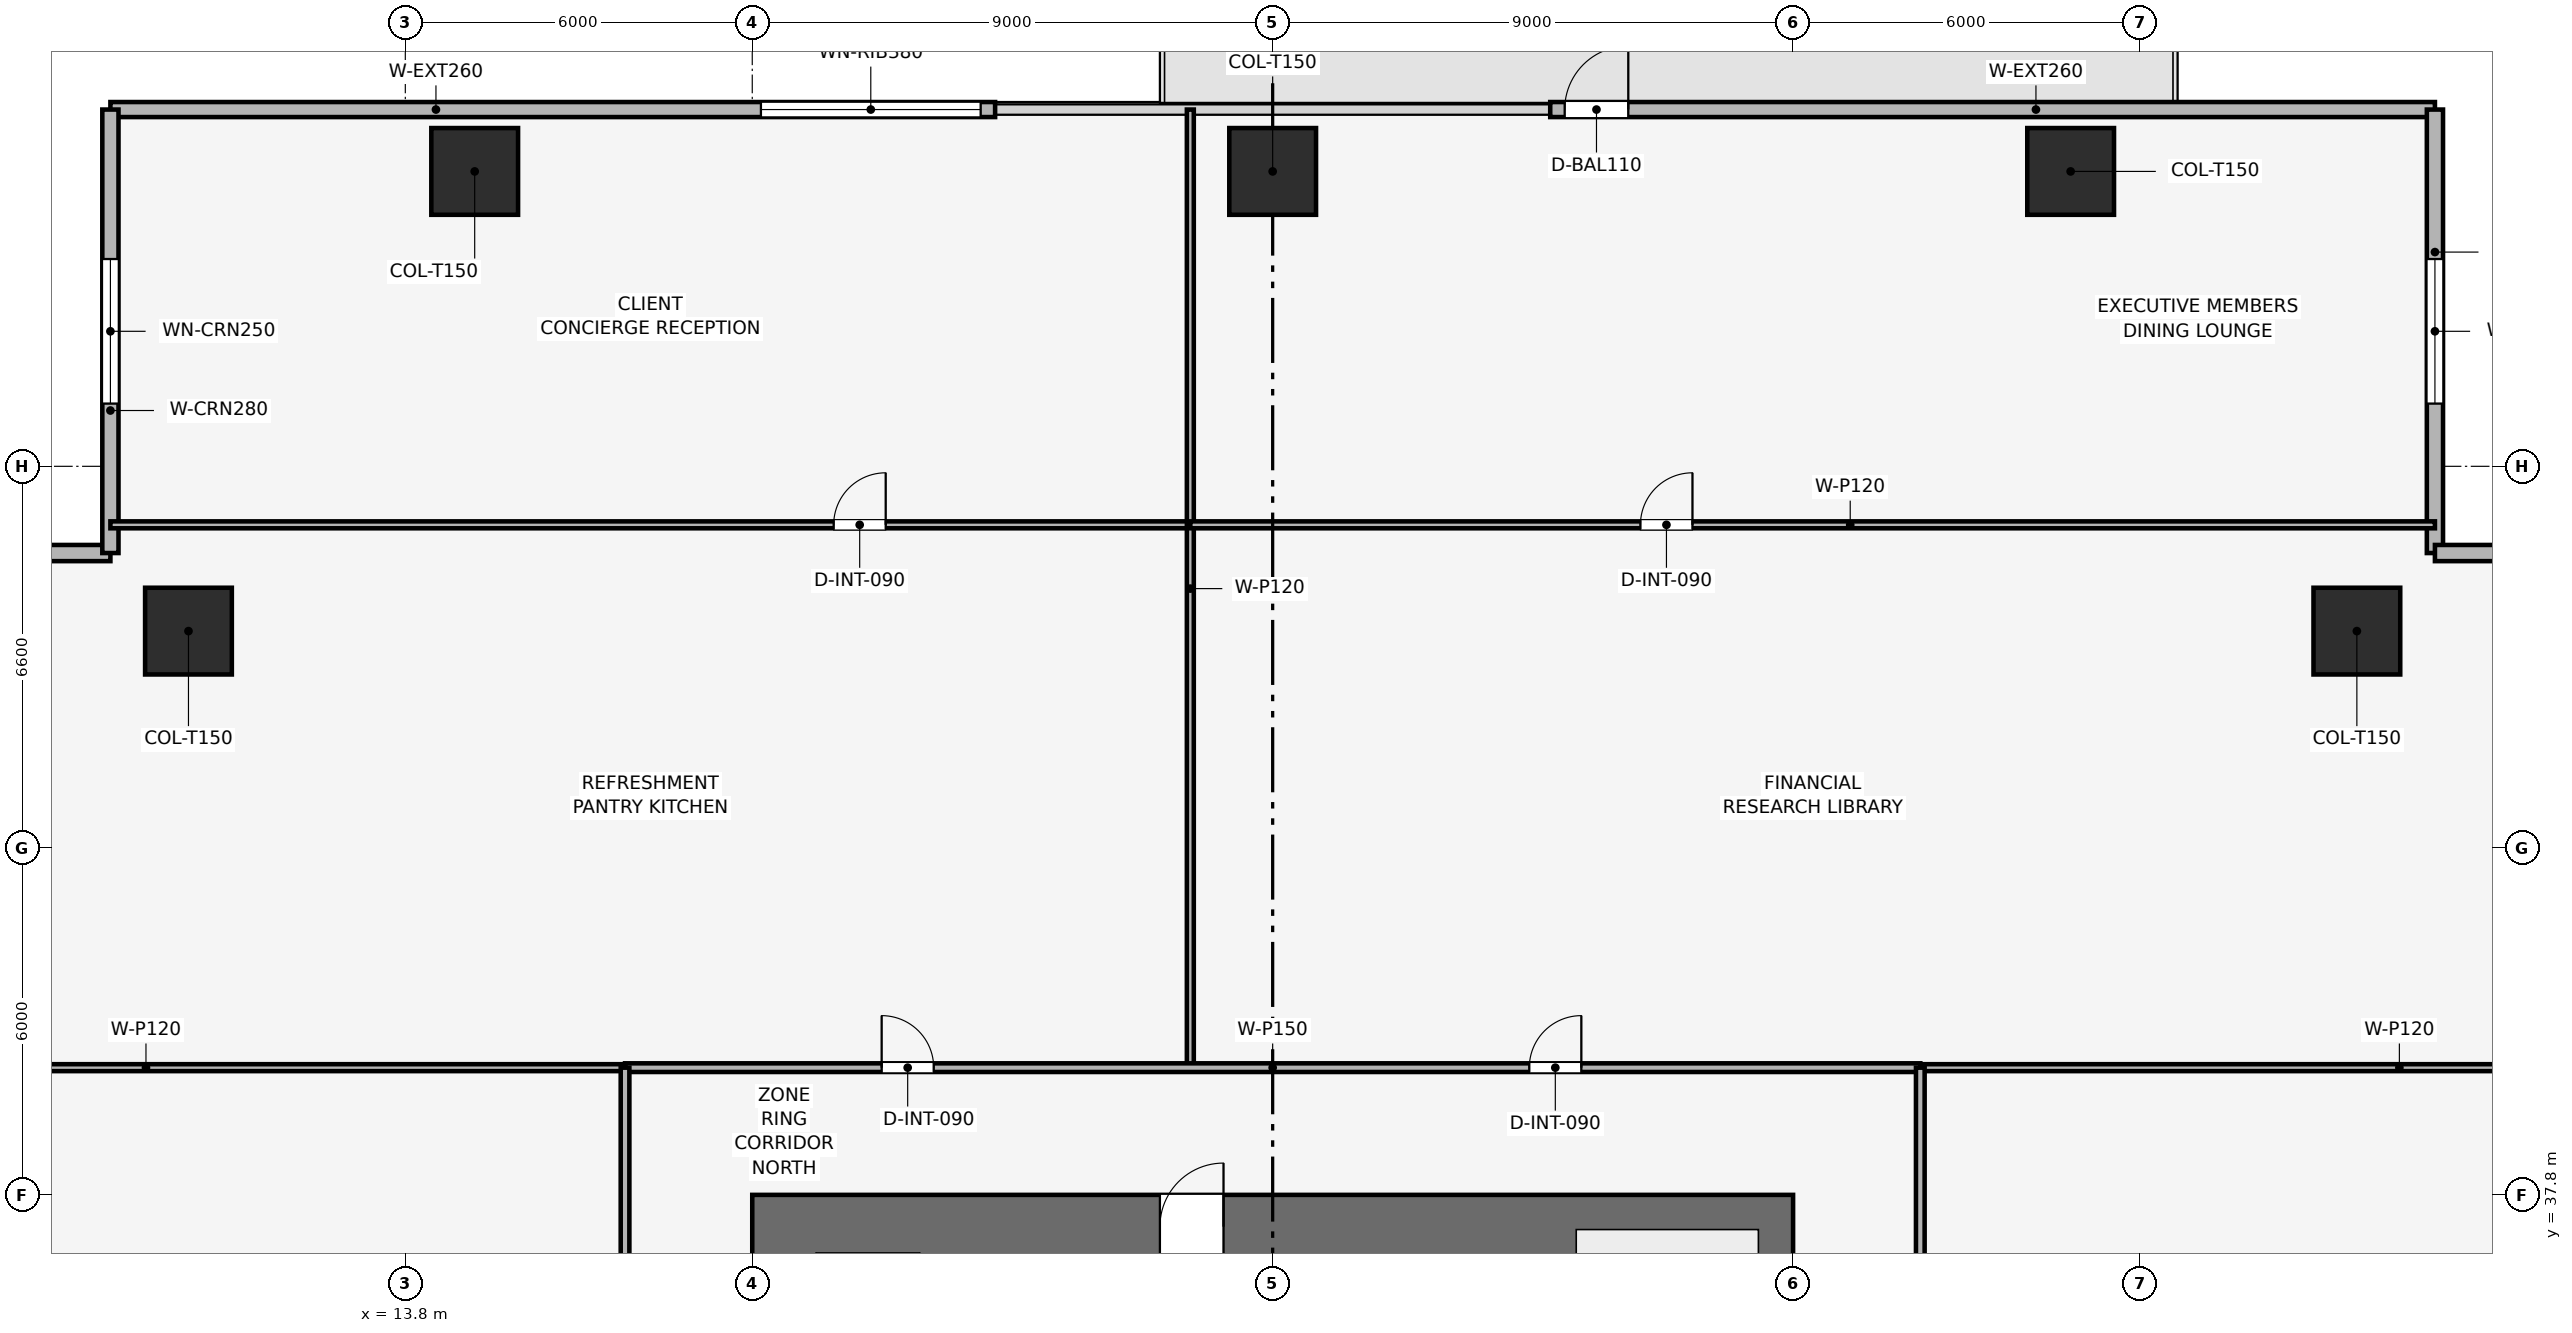
"""IFC4 building model, lengths in metres.
Left out: names, types, materials, properties, quantities, classifications, styles, units other than length and angle.
Written with IfcOpenShell. Run it as: python <this file> out.ifc"""

import sys

from ifc_helpers import new_model, si_unit, direction, frame, frame_2d, origin, origin_2d, place, context, subcontext, project, spatial, rectangle, extrude, element, fill, save


model = new_model("IFC4")
c1 = context("Model", 3, precision=1e-05, world=origin(), true_north=direction((0.0, 1.0)))
c2 = subcontext(c1, "Body", "Model", "MODEL_VIEW")
j1 = project(units=[si_unit("LENGTHUNIT", "METRE"), si_unit("PLANEANGLEUNIT", "RADIAN")], contexts=[c1])
p1 = place(None, origin())
s1 = spatial("IfcSite", under=j1, at=p1, CompositionType="ELEMENT")
p2 = place(p1, origin())
s2 = spatial("IfcBuilding", under=s1, at=p2, CompositionType="ELEMENT")
p3 = place(p2, frame((0.0, 0.0, 76.8)))
s3 = spatial("IfcBuildingStorey", under=s2, at=p3, CompositionType="ELEMENT", Elevation=76.8)
p4 = place(p3, frame((19.8, 37.25, 0.0), z_axis=(0.0, 0.0, 1.0), x_axis=(1.0, 0.0, 0.0)))
e1 = element("IfcWall", 1, at=p4, inside=s3, PredefinedType="SHEAR", context=c2, shape_type="SweptSolid", body=[
    extrude(rectangle(XDim=18.0, YDim=1.1, at=frame_2d((9.0, 0.0))), origin(), (0.0, 0.0, 1.0), 3.9),
])
p5 = place(p4, frame((7.05, 0.0, 0.0)))
e2 = element("IfcOpeningElement", 2, at=p5, cuts=e1, PredefinedType="OPENING", context=c2, shape_type="SweptSolid", body=[
    extrude(rectangle(XDim=1.1, YDim=2.15, at=frame_2d((0.55, 1.075))), frame((0.0, 0.56, 0.0), z_axis=(0.0, -1.0, 0.0), x_axis=(1.0, 0.0, 0.0)), (0.0, 0.0, 1.0), 1.12),
])
for number, where, z_axis, x_axis in (
    (3, (42.6, 55.5, 0.003), (0.0, 0.0, 1.0), (1.0, 0.0, 0.0)),
    (4, (28.8, 55.5, 0.003), (0.0, 0.0, 1.0), (1.0, 0.0, 0.0)),
    (5, (15.0, 55.5, 0.003), (0.0, 0.0, 1.0), (1.0, 0.0, 0.0)),
    (6, (47.55, 47.55, 0.003), (0.0, 0.0, 1.0), (1.0, 0.0, 0.0)),
    (7, (10.05, 47.55, 0.003), (0.0, 0.0, 1.0), (1.0, 0.0, 0.0)),
):
    element("IfcColumn", number, at=place(p3, frame(where, z_axis=z_axis, x_axis=x_axis)), inside=s3, PredefinedType="COLUMN", context=c2, shape_type="SweptSolid", body=[
        extrude(rectangle(XDim=1.5, YDim=1.5, at=origin_2d()), origin(), (0.0, 0.0, 1.0), 3.644),
    ])
p6 = place(p3, frame((8.7, 56.57, 0.0), z_axis=(0.0, 0.0, 1.0), x_axis=(1.0, 0.0, 0.0)))
e8 = element("IfcWall", 8, at=p6, inside=s3, PredefinedType="SOLIDWALL", context=c2, shape_type="SweptSolid", body=[
    extrude(rectangle(XDim=15.3, YDim=0.26, at=frame_2d((7.65, 0.0))), origin(), (0.0, 0.0, 1.0), 3.65),
])
p7 = place(p6, frame((11.25, 0.0, 0.9)))
e9 = element("IfcOpeningElement", 9, at=p7, cuts=e8, PredefinedType="OPENING", context=c2, shape_type="SweptSolid", body=[
    extrude(rectangle(XDim=3.8, YDim=1.9, at=frame_2d((1.9, 0.95))), frame((0.0, 0.14, 0.0), z_axis=(0.0, -1.0, 0.0), x_axis=(1.0, 0.0, 0.0)), (0.0, 0.0, 1.0), 0.28),
])
p8 = place(p3, frame((33.6, 56.57, 0.0), z_axis=(0.0, 0.0, 1.0), x_axis=(1.0, 0.0, 0.0)))
e10 = element("IfcWall", 10, at=p8, inside=s3, PredefinedType="SOLIDWALL", context=c2, shape_type="SweptSolid", body=[
    extrude(rectangle(XDim=15.3, YDim=0.26, at=frame_2d((7.65, 0.0))), origin(), (0.0, 0.0, 1.0), 3.65),
])
p9 = place(p8, frame((0.25, 0.0, 0.0)))
e11 = element("IfcOpeningElement", 11, at=p9, cuts=e10, PredefinedType="OPENING", context=c2, shape_type="SweptSolid", body=[
    extrude(rectangle(XDim=1.1, YDim=2.2, at=frame_2d((0.55, 1.1))), frame((0.0, 0.14, 0.0), z_axis=(0.0, -1.0, 0.0), x_axis=(1.0, 0.0, 0.0)), (0.0, 0.0, 1.0), 0.28),
])
p10 = place(p3, frame((1.03, 48.9, 0.0), z_axis=(0.0, 0.0, 1.0), x_axis=(1.0, 0.0, 0.0)))
e12 = element("IfcWall", 12, at=p10, inside=s3, PredefinedType="SOLIDWALL", context=c2, shape_type="SweptSolid", body=[
    extrude(rectangle(XDim=7.67, YDim=0.28, at=frame_2d((3.835, 0.0))), origin(), (0.0, 0.0, 1.0), 3.65),
])
p11 = place(p10, frame((2.585, 0.0, 0.9)))
e13 = element("IfcOpeningElement", 13, at=p11, cuts=e12, PredefinedType="OPENING", context=c2, shape_type="SweptSolid", body=[
    extrude(rectangle(XDim=2.5, YDim=1.9, at=frame_2d((1.25, 0.95))), frame((0.0, 0.15, 0.0), z_axis=(0.0, -1.0, 0.0), x_axis=(1.0, 0.0, 0.0)), (0.0, 0.0, 1.0), 0.3),
])
p12 = place(p3, frame((8.7, 48.9, 0.0), z_axis=(0.0, 0.0, 1.0), x_axis=(0.0, 1.0, 0.0)))
e14 = element("IfcWall", 14, at=p12, inside=s3, PredefinedType="SOLIDWALL", context=c2, shape_type="SweptSolid", body=[
    extrude(rectangle(XDim=7.67, YDim=0.28, at=frame_2d((3.835, 0.0))), origin(), (0.0, 0.0, 1.0), 3.65),
])
p13 = place(p12, frame((2.585, 0.0, 0.9)))
e15 = element("IfcOpeningElement", 15, at=p13, cuts=e14, PredefinedType="OPENING", context=c2, shape_type="SweptSolid", body=[
    extrude(rectangle(XDim=2.5, YDim=1.9, at=frame_2d((1.25, 0.95))), frame((0.0, 0.15, 0.0), z_axis=(0.0, -1.0, 0.0), x_axis=(1.0, 0.0, 0.0)), (0.0, 0.0, 1.0), 0.3),
])
p14 = place(p3, frame((48.9, 56.57, 0.0), z_axis=(0.0, 0.0, 1.0), x_axis=(0.0, -1.0, 0.0)))
e16 = element("IfcWall", 16, at=p14, inside=s3, PredefinedType="SOLIDWALL", context=c2, shape_type="SweptSolid", body=[
    extrude(rectangle(XDim=7.67, YDim=0.28, at=frame_2d((3.835, 0.0))), origin(), (0.0, 0.0, 1.0), 3.65),
])
p15 = place(p14, frame((2.585, 0.0, 0.9)))
e17 = element("IfcOpeningElement", 17, at=p15, cuts=e16, PredefinedType="OPENING", context=c2, shape_type="SweptSolid", body=[
    extrude(rectangle(XDim=2.5, YDim=1.9, at=frame_2d((1.25, 0.95))), frame((0.0, 0.15, 0.0), z_axis=(0.0, -1.0, 0.0), x_axis=(1.0, 0.0, 0.0)), (0.0, 0.0, 1.0), 0.3),
])
p16 = place(p3, frame((48.9, 48.9, 0.0), z_axis=(0.0, 0.0, 1.0), x_axis=(1.0, 0.0, 0.0)))
e18 = element("IfcWall", 18, at=p16, inside=s3, PredefinedType="SOLIDWALL", context=c2, shape_type="SweptSolid", body=[
    extrude(rectangle(XDim=7.67, YDim=0.28, at=frame_2d((3.835, 0.0))), origin(), (0.0, 0.0, 1.0), 3.65),
])
p17 = place(p16, frame((2.585, 0.0, 0.9)))
e19 = element("IfcOpeningElement", 19, at=p17, cuts=e18, PredefinedType="OPENING", context=c2, shape_type="SweptSolid", body=[
    extrude(rectangle(XDim=2.5, YDim=1.9, at=frame_2d((1.25, 0.95))), frame((0.0, 0.15, 0.0), z_axis=(0.0, -1.0, 0.0), x_axis=(1.0, 0.0, 0.0)), (0.0, 0.0, 1.0), 0.3),
])
p18 = place(p3, frame((8.7, 49.388, 0.0), z_axis=(0.0, 0.0, 1.0), x_axis=(1.0, 0.0, 0.0)))
e20 = element("IfcWall", 20, at=p18, inside=s3, PredefinedType="PARTITIONING", context=c2, shape_type="SweptSolid", body=[
    extrude(rectangle(XDim=18.676, YDim=0.12, at=frame_2d((9.338, 0.0))), origin(), (0.0, 0.0, 1.0), 2.935),
])
p19 = place(p18, frame((12.508, 0.0, 0.0)))
e21 = element("IfcOpeningElement", 21, at=p19, cuts=e20, PredefinedType="OPENING", context=c2, shape_type="SweptSolid", body=[
    extrude(rectangle(XDim=0.9, YDim=2.1, at=frame_2d((0.45, 1.05))), frame((0.0, 0.07, 0.0), z_axis=(0.0, -1.0, 0.0), x_axis=(1.0, 0.0, 0.0)), (0.0, 0.0, 1.0), 0.14),
])
p20 = place(p3, frame((27.376, 40.0, 0.0), z_axis=(0.0, 0.0, 1.0), x_axis=(0.0, 1.0, 0.0)))
e22 = element("IfcWall", 22, at=p20, inside=s3, PredefinedType="PARTITIONING", context=c2, shape_type="SweptSolid", body=[
    extrude(rectangle(XDim=16.57, YDim=0.12, at=frame_2d((8.285, 0.0))), origin(), (0.0, 0.0, 1.0), 2.935),
])
p21 = place(p3, frame((27.376, 49.388, 0.0), z_axis=(0.0, 0.0, 1.0), x_axis=(1.0, 0.0, 0.0)))
e23 = element("IfcWall", 23, at=p21, inside=s3, PredefinedType="PARTITIONING", context=c2, shape_type="SweptSolid", body=[
    extrude(rectangle(XDim=21.524, YDim=0.12, at=frame_2d((10.762, 0.0))), origin(), (0.0, 0.0, 1.0), 2.935),
])
p22 = place(p21, frame((7.784, 0.0, 0.0)))
e24 = element("IfcOpeningElement", 24, at=p22, cuts=e23, PredefinedType="OPENING", context=c2, shape_type="SweptSolid", body=[
    extrude(rectangle(XDim=0.9, YDim=2.1, at=frame_2d((0.45, 1.05))), frame((0.0, 0.07, 0.0), z_axis=(0.0, -1.0, 0.0), x_axis=(1.0, 0.0, 0.0)), (0.0, 0.0, 1.0), 0.14),
])
for number, where, z_axis, x_axis in (
    (25, (1.03, 40.0, 0.0), (0.0, 0.0, 1.0), (1.0, 0.0, 0.0)),
    (26, (40.0, 40.0, 0.0), (0.0, 0.0, 1.0), (1.0, 0.0, 0.0)),
):
    element("IfcWall", number, at=place(p3, frame(where, z_axis=z_axis, x_axis=x_axis)), inside=s3, PredefinedType="PARTITIONING", context=c2, shape_type="SweptSolid", body=[
        extrude(rectangle(XDim=16.57, YDim=0.12, at=frame_2d((8.285, 0.0))), origin(), (0.0, 0.0, 1.0), 2.935),
    ])
p23 = place(p3, frame((17.6, 40.0, 0.0), z_axis=(0.0, 0.0, 1.0), x_axis=(1.0, 0.0, 0.0)))
e27 = element("IfcWall", 27, at=p23, inside=s3, PredefinedType="PARTITIONING", context=c2, shape_type="SweptSolid", body=[
    extrude(rectangle(XDim=22.4, YDim=0.15, at=frame_2d((11.2, 0.0))), origin(), (0.0, 0.0, 1.0), 3.085),
])
p24 = place(p23, frame((4.438, 0.0, 0.0)))
e28 = element("IfcOpeningElement", 28, at=p24, cuts=e27, PredefinedType="OPENING", context=c2, shape_type="SweptSolid", body=[
    extrude(rectangle(XDim=0.9, YDim=2.1, at=frame_2d((0.45, 1.05))), frame((0.0, 0.085, 0.0), z_axis=(0.0, -1.0, 0.0), x_axis=(1.0, 0.0, 0.0)), (0.0, 0.0, 1.0), 0.17),
])
p25 = place(p23, frame((15.638, 0.0, 0.0)))
e29 = element("IfcOpeningElement", 29, at=p25, cuts=e27, PredefinedType="OPENING", context=c2, shape_type="SweptSolid", body=[
    extrude(rectangle(XDim=0.9, YDim=2.1, at=frame_2d((0.45, 1.05))), frame((0.0, 0.085, 0.0), z_axis=(0.0, -1.0, 0.0), x_axis=(1.0, 0.0, 0.0)), (0.0, 0.0, 1.0), 0.17),
])
p26 = place(p3, frame((17.6, 17.6, 0.0), z_axis=(0.0, 0.0, 1.0), x_axis=(0.0, 1.0, 0.0)))
e30 = element("IfcWall", 30, at=p26, inside=s3, PredefinedType="PARTITIONING", context=c2, shape_type="SweptSolid", body=[
    extrude(rectangle(XDim=22.4, YDim=0.15, at=frame_2d((11.2, 0.0))), origin(), (0.0, 0.0, 1.0), 3.085),
])
p27 = place(p26, frame((1.4, 0.0, 0.0)))
e31 = element("IfcOpeningElement", 31, at=p27, cuts=e30, PredefinedType="OPENING", context=c2, shape_type="SweptSolid", body=[
    extrude(rectangle(XDim=0.9, YDim=2.1, at=frame_2d((0.45, 1.05))), frame((0.0, 0.085, 0.0), z_axis=(0.0, -1.0, 0.0), x_axis=(1.0, 0.0, 0.0)), (0.0, 0.0, 1.0), 0.17),
])
p28 = place(p26, frame((4.65, 0.0, 0.0)))
e32 = element("IfcOpeningElement", 32, at=p28, cuts=e30, PredefinedType="OPENING", context=c2, shape_type="SweptSolid", body=[
    extrude(rectangle(XDim=0.9, YDim=2.1, at=frame_2d((0.45, 1.05))), frame((0.0, 0.085, 0.0), z_axis=(0.0, -1.0, 0.0), x_axis=(1.0, 0.0, 0.0)), (0.0, 0.0, 1.0), 0.17),
])
p29 = place(p26, frame((7.55, 0.0, 0.0)))
e33 = element("IfcOpeningElement", 33, at=p29, cuts=e30, PredefinedType="OPENING", context=c2, shape_type="SweptSolid", body=[
    extrude(rectangle(XDim=0.9, YDim=2.1, at=frame_2d((0.45, 1.05))), frame((0.0, 0.085, 0.0), z_axis=(0.0, -1.0, 0.0), x_axis=(1.0, 0.0, 0.0)), (0.0, 0.0, 1.0), 0.17),
])
p30 = place(p26, frame((10.3, 0.0, 0.0)))
e34 = element("IfcOpeningElement", 34, at=p30, cuts=e30, PredefinedType="OPENING", context=c2, shape_type="SweptSolid", body=[
    extrude(rectangle(XDim=0.95, YDim=2.1, at=frame_2d((0.475, 1.05))), frame((0.0, 0.085, 0.0), z_axis=(0.0, -1.0, 0.0), x_axis=(1.0, 0.0, 0.0)), (0.0, 0.0, 1.0), 0.17),
])
p31 = place(p26, frame((16.8, 0.0, 0.0)))
e35 = element("IfcOpeningElement", 35, at=p31, cuts=e30, PredefinedType="OPENING", context=c2, shape_type="SweptSolid", body=[
    extrude(rectangle(XDim=0.9, YDim=2.1, at=frame_2d((0.45, 1.05))), frame((0.0, 0.085, 0.0), z_axis=(0.0, -1.0, 0.0), x_axis=(1.0, 0.0, 0.0)), (0.0, 0.0, 1.0), 0.17),
])
p32 = place(p3, frame((40.0, 17.6, 0.0), z_axis=(0.0, 0.0, 1.0), x_axis=(0.0, 1.0, 0.0)))
e36 = element("IfcWall", 36, at=p32, inside=s3, PredefinedType="PARTITIONING", context=c2, shape_type="SweptSolid", body=[
    extrude(rectangle(XDim=22.4, YDim=0.15, at=frame_2d((11.2, 0.0))), origin(), (0.0, 0.0, 1.0), 3.085),
])
p33 = place(p32, frame((0.7, 0.0, 0.0)))
e37 = element("IfcOpeningElement", 37, at=p33, cuts=e36, PredefinedType="OPENING", context=c2, shape_type="SweptSolid", body=[
    extrude(rectangle(XDim=0.9, YDim=2.1, at=frame_2d((0.45, 1.05))), frame((0.0, 0.085, 0.0), z_axis=(0.0, -1.0, 0.0), x_axis=(1.0, 0.0, 0.0)), (0.0, 0.0, 1.0), 0.17),
])
p34 = place(p32, frame((4.927, 0.0, 0.0)))
e38 = element("IfcOpeningElement", 38, at=p34, cuts=e36, PredefinedType="OPENING", context=c2, shape_type="SweptSolid", body=[
    extrude(rectangle(XDim=0.9, YDim=2.1, at=frame_2d((0.45, 1.05))), frame((0.0, 0.085, 0.0), z_axis=(0.0, -1.0, 0.0), x_axis=(1.0, 0.0, 0.0)), (0.0, 0.0, 1.0), 0.17),
])
p35 = place(p32, frame((10.886, 0.0, 0.0)))
e39 = element("IfcOpeningElement", 39, at=p35, cuts=e36, PredefinedType="OPENING", context=c2, shape_type="SweptSolid", body=[
    extrude(rectangle(XDim=0.9, YDim=2.1, at=frame_2d((0.45, 1.05))), frame((0.0, 0.085, 0.0), z_axis=(0.0, -1.0, 0.0), x_axis=(1.0, 0.0, 0.0)), (0.0, 0.0, 1.0), 0.17),
])
p36 = place(p32, frame((17.859, 0.0, 0.0)))
e40 = element("IfcOpeningElement", 40, at=p36, cuts=e36, PredefinedType="OPENING", context=c2, shape_type="SweptSolid", body=[
    extrude(rectangle(XDim=0.9, YDim=2.1, at=frame_2d((0.45, 1.05))), frame((0.0, 0.085, 0.0), z_axis=(0.0, -1.0, 0.0), x_axis=(1.0, 0.0, 0.0)), (0.0, 0.0, 1.0), 0.17),
])
p37 = place(p9, origin())
e41 = element("IfcDoor", 41, at=p37, inside=s3, OperationType="SINGLE_SWING_RIGHT", PredefinedType="DOOR", context=c2, shape_type="SweptSolid", body=[
    extrude(rectangle(XDim=1.1, YDim=2.2, at=frame_2d((0.55, 1.1))), frame((0.0, 0.025, 0.0), z_axis=(0.0, -1.0, 0.0), x_axis=(1.0, 0.0, 0.0)), (0.0, 0.0, 1.0), 0.05),
])
fill(e11, e41)
p38 = place(p7, origin())
e42 = element("IfcWindow", 42, at=p38, inside=s3, PartitioningType="SINGLE_PANEL", PredefinedType="WINDOW", context=c2, shape_type="SweptSolid", body=[
    extrude(rectangle(XDim=3.8, YDim=1.9, at=frame_2d((1.9, 0.95))), frame((0.0, 0.03, 0.0), z_axis=(0.0, -1.0, 0.0), x_axis=(1.0, 0.0, 0.0)), (0.0, 0.0, 1.0), 0.06),
])
fill(e9, e42)
p39 = place(p13, origin())
e43 = element("IfcWindow", 43, at=p39, inside=s3, PartitioningType="SINGLE_PANEL", PredefinedType="WINDOW", context=c2, shape_type="SweptSolid", body=[
    extrude(rectangle(XDim=2.5, YDim=1.9, at=frame_2d((1.25, 0.95))), frame((0.0, 0.03, 0.0), z_axis=(0.0, -1.0, 0.0), x_axis=(1.0, 0.0, 0.0)), (0.0, 0.0, 1.0), 0.06),
])
fill(e15, e43)
p40 = place(p15, origin())
e44 = element("IfcWindow", 44, at=p40, inside=s3, PartitioningType="SINGLE_PANEL", PredefinedType="WINDOW", context=c2, shape_type="SweptSolid", body=[
    extrude(rectangle(XDim=2.5, YDim=1.9, at=frame_2d((1.25, 0.95))), frame((0.0, 0.03, 0.0), z_axis=(0.0, -1.0, 0.0), x_axis=(1.0, 0.0, 0.0)), (0.0, 0.0, 1.0), 0.06),
])
fill(e17, e44)
p41 = place(p19, origin())
e45 = element("IfcDoor", 45, at=p41, inside=s3, OperationType="SINGLE_SWING_RIGHT", PredefinedType="DOOR", context=c2, shape_type="SweptSolid", body=[
    extrude(rectangle(XDim=0.9, YDim=2.1, at=frame_2d((0.45, 1.05))), frame((0.0, 0.025, 0.0), z_axis=(0.0, -1.0, 0.0), x_axis=(1.0, 0.0, 0.0)), (0.0, 0.0, 1.0), 0.05),
])
fill(e21, e45)
p42 = place(p22, origin())
e46 = element("IfcDoor", 46, at=p42, inside=s3, OperationType="SINGLE_SWING_RIGHT", PredefinedType="DOOR", context=c2, shape_type="SweptSolid", body=[
    extrude(rectangle(XDim=0.9, YDim=2.1, at=frame_2d((0.45, 1.05))), frame((0.0, 0.025, 0.0), z_axis=(0.0, -1.0, 0.0), x_axis=(1.0, 0.0, 0.0)), (0.0, 0.0, 1.0), 0.05),
])
fill(e24, e46)
p43 = place(p24, origin())
e47 = element("IfcDoor", 47, at=p43, inside=s3, OperationType="SINGLE_SWING_LEFT", PredefinedType="DOOR", context=c2, shape_type="SweptSolid", body=[
    extrude(rectangle(XDim=0.9, YDim=2.1, at=frame_2d((0.45, 1.05))), frame((0.0, 0.025, 0.0), z_axis=(0.0, -1.0, 0.0), x_axis=(1.0, 0.0, 0.0)), (0.0, 0.0, 1.0), 0.05),
])
fill(e28, e47)
p44 = place(p25, origin())
e48 = element("IfcDoor", 48, at=p44, inside=s3, OperationType="SINGLE_SWING_RIGHT", PredefinedType="DOOR", context=c2, shape_type="SweptSolid", body=[
    extrude(rectangle(XDim=0.9, YDim=2.1, at=frame_2d((0.45, 1.05))), frame((0.0, 0.025, 0.0), z_axis=(0.0, -1.0, 0.0), x_axis=(1.0, 0.0, 0.0)), (0.0, 0.0, 1.0), 0.05),
])
fill(e29, e48)
p45 = place(p5, origin())
e49 = element("IfcDoor", 49, at=p45, inside=s3, OperationType="SINGLE_SWING_RIGHT", PredefinedType="DOOR", context=c2, shape_type="SweptSolid", body=[
    extrude(rectangle(XDim=1.1, YDim=2.15, at=frame_2d((0.55, 1.075))), frame((0.0, 0.025, 0.0), z_axis=(0.0, -1.0, 0.0), x_axis=(1.0, 0.0, 0.0)), (0.0, 0.0, 1.0), 0.05),
])
fill(e2, e49)
save(model, sys.argv[1])
